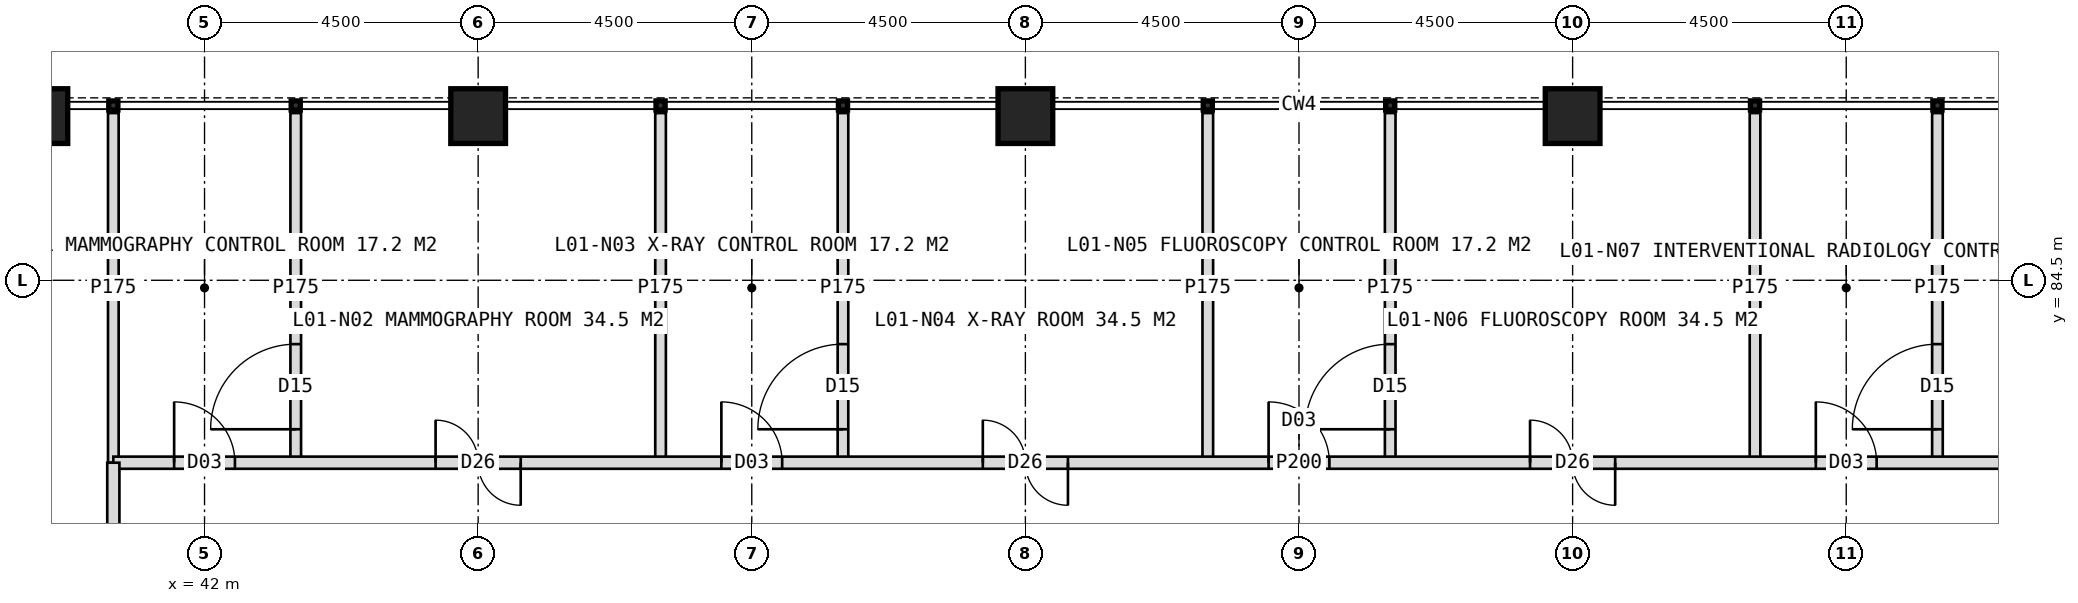
"""IFC4 building model, lengths in metres.
Left out: names, types, materials, properties, quantities, classifications, styles, units other than length and angle.
Written with IfcOpenShell. Run it as: python <this file> out.ifc"""

import sys

from ifc_helpers import new_model, si_unit, direction, frame, frame_2d, origin, origin_2d, place, context, subcontext, project, spatial, rectangle, hollow_rectangle, extrude, element, fill, save


model = new_model("IFC4")
c1 = context("Model", 3, precision=1e-05, world=origin(), true_north=direction((0.0, 1.0)))
c2 = subcontext(c1, "Body", "Model", "MODEL_VIEW")
j1 = project(units=[si_unit("LENGTHUNIT", "METRE"), si_unit("PLANEANGLEUNIT", "RADIAN")], contexts=[c1])
p1 = place(None, origin())
s1 = spatial("IfcSite", under=j1, at=p1, CompositionType="ELEMENT")
p2 = place(p1, origin())
s2 = spatial("IfcBuilding", under=s1, at=p2, CompositionType="ELEMENT")
p3 = place(p2, frame((0.0, 0.0, 6.0)))
s3 = spatial("IfcBuildingStorey", under=s2, at=p3, CompositionType="ELEMENT", Elevation=6.0)
for number, where, z_axis, x_axis in (
    (1, (39.3, 87.2, 0.0), (0.0, 0.0, 1.0), (1.0, 0.0, 0.0)),
    (2, (46.5, 87.2, 0.0), (0.0, 0.0, 1.0), (1.0, 0.0, 0.0)),
    (3, (55.5, 87.2, 0.0), (0.0, 0.0, 1.0), (1.0, 0.0, 0.0)),
    (4, (64.5, 87.2, 0.0), (0.0, 0.0, 1.0), (1.0, 0.0, 0.0)),
):
    element("IfcColumn", number, at=place(p3, frame(where, z_axis=z_axis, x_axis=x_axis)), inside=s3, PredefinedType="COLUMN", context=c2, shape_type="SweptSolid", body=[
        extrude(hollow_rectangle(XDim=0.9, YDim=0.9, WallThickness=0.08, at=origin_2d()), origin(), (0.0, 0.0, 1.0), 5.0),
    ])
p4 = place(p3, frame((40.5, 81.5, 0.0), z_axis=(0.0, 0.0, 1.0), x_axis=(0.0, 1.0, 0.0)))
e5 = element("IfcWall", 5, at=p4, inside=s3, PredefinedType="PARTITIONING", context=c2, shape_type="SweptSolid", body=[
    extrude(rectangle(XDim=5.75, YDim=0.175, at=frame_2d((2.875, 0.0))), origin(), (0.0, 0.0, 1.0), 4.7),
])
p5 = place(p3, frame((43.5, 81.5, 0.0), z_axis=(0.0, 0.0, 1.0), x_axis=(0.0, 1.0, 0.0)))
e6 = element("IfcWall", 6, at=p5, inside=s3, PredefinedType="PARTITIONING", context=c2, shape_type="SweptSolid", body=[
    extrude(rectangle(XDim=5.75, YDim=0.175, at=frame_2d((2.875, 0.0))), origin(), (0.0, 0.0, 1.0), 4.7),
])
p6 = place(p5, frame((0.55, 0.0, 0.0)))
e7 = element("IfcOpeningElement", 7, at=p6, cuts=e6, PredefinedType="OPENING", context=c2, shape_type="SweptSolid", body=[
    extrude(rectangle(XDim=1.4, YDim=2.1, at=frame_2d((0.7, 1.05))), frame((0.0, 0.097, 0.0), z_axis=(0.0, -1.0, 0.0), x_axis=(1.0, 0.0, 0.0)), (0.0, 0.0, 1.0), 0.195),
])
p7 = place(p3, frame((49.5, 81.5, 0.0), z_axis=(0.0, 0.0, 1.0), x_axis=(0.0, 1.0, 0.0)))
e8 = element("IfcWall", 8, at=p7, inside=s3, PredefinedType="PARTITIONING", context=c2, shape_type="SweptSolid", body=[
    extrude(rectangle(XDim=5.75, YDim=0.175, at=frame_2d((2.875, 0.0))), origin(), (0.0, 0.0, 1.0), 4.7),
])
p8 = place(p3, frame((52.5, 81.5, 0.0), z_axis=(0.0, 0.0, 1.0), x_axis=(0.0, 1.0, 0.0)))
e9 = element("IfcWall", 9, at=p8, inside=s3, PredefinedType="PARTITIONING", context=c2, shape_type="SweptSolid", body=[
    extrude(rectangle(XDim=5.75, YDim=0.175, at=frame_2d((2.875, 0.0))), origin(), (0.0, 0.0, 1.0), 4.7),
])
p9 = place(p8, frame((0.55, 0.0, 0.0)))
e10 = element("IfcOpeningElement", 10, at=p9, cuts=e9, PredefinedType="OPENING", context=c2, shape_type="SweptSolid", body=[
    extrude(rectangle(XDim=1.4, YDim=2.1, at=frame_2d((0.7, 1.05))), frame((0.0, 0.097, 0.0), z_axis=(0.0, -1.0, 0.0), x_axis=(1.0, 0.0, 0.0)), (0.0, 0.0, 1.0), 0.195),
])
p10 = place(p3, frame((58.5, 81.5, 0.0), z_axis=(0.0, 0.0, 1.0), x_axis=(0.0, 1.0, 0.0)))
e11 = element("IfcWall", 11, at=p10, inside=s3, PredefinedType="PARTITIONING", context=c2, shape_type="SweptSolid", body=[
    extrude(rectangle(XDim=5.75, YDim=0.175, at=frame_2d((2.875, 0.0))), origin(), (0.0, 0.0, 1.0), 4.7),
])
p11 = place(p3, frame((61.5, 81.5, 0.0), z_axis=(0.0, 0.0, 1.0), x_axis=(0.0, 1.0, 0.0)))
e12 = element("IfcWall", 12, at=p11, inside=s3, PredefinedType="PARTITIONING", context=c2, shape_type="SweptSolid", body=[
    extrude(rectangle(XDim=5.75, YDim=0.175, at=frame_2d((2.875, 0.0))), origin(), (0.0, 0.0, 1.0), 4.7),
])
p12 = place(p11, frame((0.55, 0.0, 0.0)))
e13 = element("IfcOpeningElement", 13, at=p12, cuts=e12, PredefinedType="OPENING", context=c2, shape_type="SweptSolid", body=[
    extrude(rectangle(XDim=1.4, YDim=2.1, at=frame_2d((0.7, 1.05))), frame((0.0, 0.097, 0.0), z_axis=(0.0, -1.0, 0.0), x_axis=(1.0, 0.0, 0.0)), (0.0, 0.0, 1.0), 0.195),
])
p13 = place(p3, frame((67.5, 81.5, 0.0), z_axis=(0.0, 0.0, 1.0), x_axis=(0.0, 1.0, 0.0)))
e14 = element("IfcWall", 14, at=p13, inside=s3, PredefinedType="PARTITIONING", context=c2, shape_type="SweptSolid", body=[
    extrude(rectangle(XDim=5.75, YDim=0.175, at=frame_2d((2.875, 0.0))), origin(), (0.0, 0.0, 1.0), 4.7),
])
p14 = place(p3, frame((70.5, 81.5, 0.0), z_axis=(0.0, 0.0, 1.0), x_axis=(0.0, 1.0, 0.0)))
e15 = element("IfcWall", 15, at=p14, inside=s3, PredefinedType="PARTITIONING", context=c2, shape_type="SweptSolid", body=[
    extrude(rectangle(XDim=5.75, YDim=0.175, at=frame_2d((2.875, 0.0))), origin(), (0.0, 0.0, 1.0), 4.7),
])
p15 = place(p14, frame((0.55, 0.0, 0.0)))
e16 = element("IfcOpeningElement", 16, at=p15, cuts=e15, PredefinedType="OPENING", context=c2, shape_type="SweptSolid", body=[
    extrude(rectangle(XDim=1.4, YDim=2.1, at=frame_2d((0.7, 1.05))), frame((0.0, 0.097, 0.0), z_axis=(0.0, -1.0, 0.0), x_axis=(1.0, 0.0, 0.0)), (0.0, 0.0, 1.0), 0.195),
])
p16 = place(p3, frame((40.5, 81.5, 0.0), z_axis=(0.0, 0.0, 1.0), x_axis=(1.0, 0.0, 0.0)))
e17 = element("IfcWall", 17, at=p16, inside=s3, PredefinedType="PARTITIONING", context=c2, shape_type="SweptSolid", body=[
    extrude(rectangle(XDim=39.0, YDim=0.2, at=frame_2d((19.5, 0.0))), origin(), (0.0, 0.0, 1.0), 4.7),
])
p17 = place(p16, frame((1.0, 0.0, 0.0)))
e18 = element("IfcOpeningElement", 18, at=p17, cuts=e17, PredefinedType="OPENING", context=c2, shape_type="SweptSolid", body=[
    extrude(rectangle(XDim=1.0, YDim=2.1, at=frame_2d((0.5, 1.05))), frame((0.0, 0.11, 0.0), z_axis=(0.0, -1.0, 0.0), x_axis=(1.0, 0.0, 0.0)), (0.0, 0.0, 1.0), 0.22),
])
p18 = place(p16, frame((5.3, 0.0, 0.0)))
e19 = element("IfcOpeningElement", 19, at=p18, cuts=e17, PredefinedType="OPENING", context=c2, shape_type="SweptSolid", body=[
    extrude(rectangle(XDim=1.4, YDim=2.2, at=frame_2d((0.7, 1.1))), frame((0.0, 0.11, 0.0), z_axis=(0.0, -1.0, 0.0), x_axis=(1.0, 0.0, 0.0)), (0.0, 0.0, 1.0), 0.22),
])
p19 = place(p16, frame((10.0, 0.0, 0.0)))
e20 = element("IfcOpeningElement", 20, at=p19, cuts=e17, PredefinedType="OPENING", context=c2, shape_type="SweptSolid", body=[
    extrude(rectangle(XDim=1.0, YDim=2.1, at=frame_2d((0.5, 1.05))), frame((0.0, 0.11, 0.0), z_axis=(0.0, -1.0, 0.0), x_axis=(1.0, 0.0, 0.0)), (0.0, 0.0, 1.0), 0.22),
])
p20 = place(p16, frame((14.3, 0.0, 0.0)))
e21 = element("IfcOpeningElement", 21, at=p20, cuts=e17, PredefinedType="OPENING", context=c2, shape_type="SweptSolid", body=[
    extrude(rectangle(XDim=1.4, YDim=2.2, at=frame_2d((0.7, 1.1))), frame((0.0, 0.11, 0.0), z_axis=(0.0, -1.0, 0.0), x_axis=(1.0, 0.0, 0.0)), (0.0, 0.0, 1.0), 0.22),
])
p21 = place(p16, frame((19.0, 0.0, 0.0)))
e22 = element("IfcOpeningElement", 22, at=p21, cuts=e17, PredefinedType="OPENING", context=c2, shape_type="SweptSolid", body=[
    extrude(rectangle(XDim=1.0, YDim=2.1, at=frame_2d((0.5, 1.05))), frame((0.0, 0.11, 0.0), z_axis=(0.0, -1.0, 0.0), x_axis=(1.0, 0.0, 0.0)), (0.0, 0.0, 1.0), 0.22),
])
p22 = place(p16, frame((23.3, 0.0, 0.0)))
e23 = element("IfcOpeningElement", 23, at=p22, cuts=e17, PredefinedType="OPENING", context=c2, shape_type="SweptSolid", body=[
    extrude(rectangle(XDim=1.4, YDim=2.2, at=frame_2d((0.7, 1.1))), frame((0.0, 0.11, 0.0), z_axis=(0.0, -1.0, 0.0), x_axis=(1.0, 0.0, 0.0)), (0.0, 0.0, 1.0), 0.22),
])
p23 = place(p16, frame((28.0, 0.0, 0.0)))
e24 = element("IfcOpeningElement", 24, at=p23, cuts=e17, PredefinedType="OPENING", context=c2, shape_type="SweptSolid", body=[
    extrude(rectangle(XDim=1.0, YDim=2.1, at=frame_2d((0.5, 1.05))), frame((0.0, 0.11, 0.0), z_axis=(0.0, -1.0, 0.0), x_axis=(1.0, 0.0, 0.0)), (0.0, 0.0, 1.0), 0.22),
])
p24 = place(p16, frame((33.8, 0.0, 0.0)))
e25 = element("IfcOpeningElement", 25, at=p24, cuts=e17, PredefinedType="OPENING", context=c2, shape_type="SweptSolid", body=[
    extrude(rectangle(XDim=1.4, YDim=2.2, at=frame_2d((0.7, 1.1))), frame((0.0, 0.11, 0.0), z_axis=(0.0, -1.0, 0.0), x_axis=(1.0, 0.0, 0.0)), (0.0, 0.0, 1.0), 0.22),
])
p25 = place(p3, frame((40.5, 42.5, 0.0), z_axis=(0.0, 0.0, 1.0), x_axis=(0.0, 1.0, 0.0)))
e26 = element("IfcWall", 26, at=p25, inside=s3, PredefinedType="PARTITIONING", context=c2, shape_type="SweptSolid", body=[
    extrude(rectangle(XDim=39.0, YDim=0.2, at=frame_2d((19.5, 0.0))), origin(), (0.0, 0.0, 1.0), 4.7),
])
p26 = place(p25, frame((0.65, 0.0, 0.0)))
e27 = element("IfcOpeningElement", 27, at=p26, cuts=e26, PredefinedType="OPENING", context=c2, shape_type="SweptSolid", body=[
    extrude(rectangle(XDim=1.6, YDim=2.2, at=frame_2d((0.8, 1.1))), frame((0.0, 0.11, 0.0), z_axis=(0.0, -1.0, 0.0), x_axis=(1.0, 0.0, 0.0)), (0.0, 0.0, 1.0), 0.22),
])
p27 = place(p25, frame((7.4, 0.0, 0.0)))
e28 = element("IfcOpeningElement", 28, at=p27, cuts=e26, PredefinedType="OPENING", context=c2, shape_type="SweptSolid", body=[
    extrude(rectangle(XDim=1.6, YDim=2.2, at=frame_2d((0.8, 1.1))), frame((0.0, 0.11, 0.0), z_axis=(0.0, -1.0, 0.0), x_axis=(1.0, 0.0, 0.0)), (0.0, 0.0, 1.0), 0.22),
])
p28 = place(p25, frame((15.7, 0.0, 0.0)))
e29 = element("IfcOpeningElement", 29, at=p28, cuts=e26, PredefinedType="OPENING", context=c2, shape_type="SweptSolid", body=[
    extrude(rectangle(XDim=1.6, YDim=2.2, at=frame_2d((0.8, 1.1))), frame((0.0, 0.11, 0.0), z_axis=(0.0, -1.0, 0.0), x_axis=(1.0, 0.0, 0.0)), (0.0, 0.0, 1.0), 0.22),
])
p29 = place(p25, frame((19.95, 0.0, 0.0)))
e30 = element("IfcOpeningElement", 30, at=p29, cuts=e26, PredefinedType="OPENING", context=c2, shape_type="SweptSolid", body=[
    extrude(rectangle(XDim=1.6, YDim=2.2, at=frame_2d((0.8, 1.1))), frame((0.0, 0.11, 0.0), z_axis=(0.0, -1.0, 0.0), x_axis=(1.0, 0.0, 0.0)), (0.0, 0.0, 1.0), 0.22),
])
p30 = place(p25, frame((26.25, 0.0, 0.0)))
e31 = element("IfcOpeningElement", 31, at=p30, cuts=e26, PredefinedType="OPENING", context=c2, shape_type="SweptSolid", body=[
    extrude(rectangle(XDim=1.0, YDim=2.1, at=frame_2d((0.5, 1.05))), frame((0.0, 0.11, 0.0), z_axis=(0.0, -1.0, 0.0), x_axis=(1.0, 0.0, 0.0)), (0.0, 0.0, 1.0), 0.22),
])
p31 = place(p25, frame((34.75, 0.0, 0.0)))
e32 = element("IfcOpeningElement", 32, at=p31, cuts=e26, PredefinedType="OPENING", context=c2, shape_type="SweptSolid", body=[
    extrude(rectangle(XDim=1.0, YDim=2.1, at=frame_2d((0.5, 1.05))), frame((0.0, 0.11, 0.0), z_axis=(0.0, -1.0, 0.0), x_axis=(1.0, 0.0, 0.0)), (0.0, 0.0, 1.0), 0.22),
])
p32 = place(p17, origin())
e33 = element("IfcDoor", 33, at=p32, inside=s3, OperationType="SINGLE_SWING_LEFT", PredefinedType="DOOR", context=c2, shape_type="SweptSolid", body=[
    extrude(rectangle(XDim=1.0, YDim=2.1, at=frame_2d((0.5, 1.05))), frame((0.0, 0.025, 0.0), z_axis=(0.0, -1.0, 0.0), x_axis=(1.0, 0.0, 0.0)), (0.0, 0.0, 1.0), 0.05),
])
fill(e18, e33)
p33 = place(p6, origin())
e34 = element("IfcDoor", 34, at=p33, inside=s3, OperationType="SINGLE_SWING_LEFT", PredefinedType="DOOR", context=c2, shape_type="SweptSolid", body=[
    extrude(rectangle(XDim=1.4, YDim=2.1, at=frame_2d((0.7, 1.05))), frame((0.0, 0.025, 0.0), z_axis=(0.0, -1.0, 0.0), x_axis=(1.0, 0.0, 0.0)), (0.0, 0.0, 1.0), 0.05),
])
fill(e7, e34)
p34 = place(p18, origin())
e35 = element("IfcDoor", 35, at=p34, inside=s3, OperationType="DOUBLE_DOOR_SINGLE_SWING", PredefinedType="DOOR", context=c2, shape_type="SweptSolid", body=[
    extrude(rectangle(XDim=1.4, YDim=2.2, at=frame_2d((0.7, 1.1))), frame((0.0, 0.025, 0.0), z_axis=(0.0, -1.0, 0.0), x_axis=(1.0, 0.0, 0.0)), (0.0, 0.0, 1.0), 0.05),
])
fill(e19, e35)
p35 = place(p19, origin())
e36 = element("IfcDoor", 36, at=p35, inside=s3, OperationType="SINGLE_SWING_LEFT", PredefinedType="DOOR", context=c2, shape_type="SweptSolid", body=[
    extrude(rectangle(XDim=1.0, YDim=2.1, at=frame_2d((0.5, 1.05))), frame((0.0, 0.025, 0.0), z_axis=(0.0, -1.0, 0.0), x_axis=(1.0, 0.0, 0.0)), (0.0, 0.0, 1.0), 0.05),
])
fill(e20, e36)
p36 = place(p9, origin())
e37 = element("IfcDoor", 37, at=p36, inside=s3, OperationType="SINGLE_SWING_LEFT", PredefinedType="DOOR", context=c2, shape_type="SweptSolid", body=[
    extrude(rectangle(XDim=1.4, YDim=2.1, at=frame_2d((0.7, 1.05))), frame((0.0, 0.025, 0.0), z_axis=(0.0, -1.0, 0.0), x_axis=(1.0, 0.0, 0.0)), (0.0, 0.0, 1.0), 0.05),
])
fill(e10, e37)
p37 = place(p20, origin())
e38 = element("IfcDoor", 38, at=p37, inside=s3, OperationType="DOUBLE_DOOR_SINGLE_SWING", PredefinedType="DOOR", context=c2, shape_type="SweptSolid", body=[
    extrude(rectangle(XDim=1.4, YDim=2.2, at=frame_2d((0.7, 1.1))), frame((0.0, 0.025, 0.0), z_axis=(0.0, -1.0, 0.0), x_axis=(1.0, 0.0, 0.0)), (0.0, 0.0, 1.0), 0.05),
])
fill(e21, e38)
p38 = place(p21, origin())
e39 = element("IfcDoor", 39, at=p38, inside=s3, OperationType="SINGLE_SWING_LEFT", PredefinedType="DOOR", context=c2, shape_type="SweptSolid", body=[
    extrude(rectangle(XDim=1.0, YDim=2.1, at=frame_2d((0.5, 1.05))), frame((0.0, 0.025, 0.0), z_axis=(0.0, -1.0, 0.0), x_axis=(1.0, 0.0, 0.0)), (0.0, 0.0, 1.0), 0.05),
])
fill(e22, e39)
p39 = place(p12, origin())
e40 = element("IfcDoor", 40, at=p39, inside=s3, OperationType="SINGLE_SWING_LEFT", PredefinedType="DOOR", context=c2, shape_type="SweptSolid", body=[
    extrude(rectangle(XDim=1.4, YDim=2.1, at=frame_2d((0.7, 1.05))), frame((0.0, 0.025, 0.0), z_axis=(0.0, -1.0, 0.0), x_axis=(1.0, 0.0, 0.0)), (0.0, 0.0, 1.0), 0.05),
])
fill(e13, e40)
p40 = place(p22, origin())
e41 = element("IfcDoor", 41, at=p40, inside=s3, OperationType="DOUBLE_DOOR_SINGLE_SWING", PredefinedType="DOOR", context=c2, shape_type="SweptSolid", body=[
    extrude(rectangle(XDim=1.4, YDim=2.2, at=frame_2d((0.7, 1.1))), frame((0.0, 0.025, 0.0), z_axis=(0.0, -1.0, 0.0), x_axis=(1.0, 0.0, 0.0)), (0.0, 0.0, 1.0), 0.05),
])
fill(e23, e41)
p41 = place(p23, origin())
e42 = element("IfcDoor", 42, at=p41, inside=s3, OperationType="SINGLE_SWING_LEFT", PredefinedType="DOOR", context=c2, shape_type="SweptSolid", body=[
    extrude(rectangle(XDim=1.0, YDim=2.1, at=frame_2d((0.5, 1.05))), frame((0.0, 0.025, 0.0), z_axis=(0.0, -1.0, 0.0), x_axis=(1.0, 0.0, 0.0)), (0.0, 0.0, 1.0), 0.05),
])
fill(e24, e42)
p42 = place(p15, origin())
e43 = element("IfcDoor", 43, at=p42, inside=s3, OperationType="SINGLE_SWING_LEFT", PredefinedType="DOOR", context=c2, shape_type="SweptSolid", body=[
    extrude(rectangle(XDim=1.4, YDim=2.1, at=frame_2d((0.7, 1.05))), frame((0.0, 0.025, 0.0), z_axis=(0.0, -1.0, 0.0), x_axis=(1.0, 0.0, 0.0)), (0.0, 0.0, 1.0), 0.05),
])
fill(e16, e43)
save(model, sys.argv[1])
